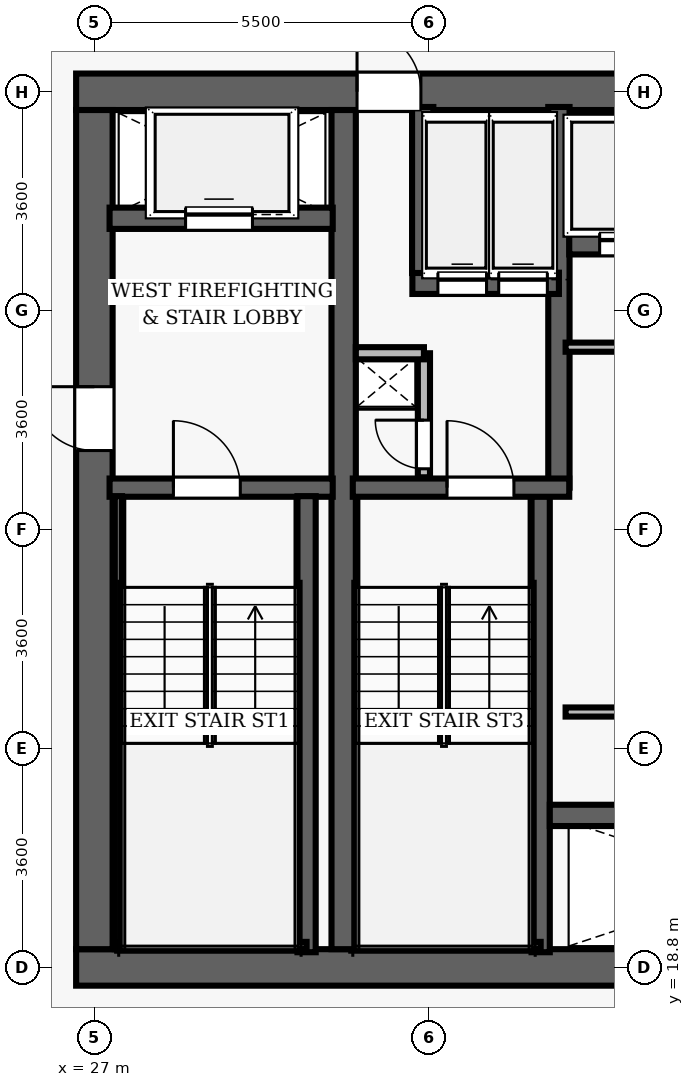
"""IFC4 building model, lengths in metres.
Left out: names, types, materials, properties, quantities, classifications, styles, units other than length and angle.
Written with IfcOpenShell. Run it as: python <this file> out.ifc"""

import sys

from ifc_helpers import new_model, si_unit, direction, frame, frame_2d, origin, place, context, subcontext, project, spatial, rectangle, extrude, element, fill, save


model = new_model("IFC4")
c1 = context("Model", 3, precision=1e-05, world=origin(), true_north=direction((0.0, 1.0)))
c2 = subcontext(c1, "Body", "Model", "MODEL_VIEW")
j1 = project(units=[si_unit("LENGTHUNIT", "METRE"), si_unit("PLANEANGLEUNIT", "RADIAN")], contexts=[c1])
p1 = place(None, origin())
s1 = spatial("IfcSite", under=j1, at=p1, CompositionType="ELEMENT")
p2 = place(p1, origin())
s2 = spatial("IfcBuilding", under=s1, at=p2, CompositionType="ELEMENT")
p3 = place(p2, frame((0.0, 0.0, 51.9)))
s3 = spatial("IfcBuildingStorey", under=s2, at=p3, CompositionType="ELEMENT", Elevation=51.9)
p4 = place(p3, frame((26.7, 18.8, 0.0), z_axis=(0.0, 0.0, 1.0), x_axis=(1.0, 0.0, 0.0)))
e1 = element("IfcWall", 1, at=p4, inside=s3, PredefinedType="SHEAR", context=c2, shape_type="SweptSolid", body=[
    extrude(rectangle(XDim=22.6, YDim=0.6, at=frame_2d((11.3, 0.0))), origin(), (0.0, 0.0, 1.0), 3.5),
])
p5 = place(p4, frame((14.52, 0.0, 0.0)))
e2 = element("IfcOpeningElement", 2, at=p5, cuts=e1, PredefinedType="OPENING", context=c2, shape_type="SweptSolid", body=[
    extrude(rectangle(XDim=1.05, YDim=2.15, at=frame_2d((0.525, 1.075))), frame((0.0, 0.31, 0.0), z_axis=(0.0, -1.0, 0.0), x_axis=(1.0, 0.0, 0.0)), (0.0, 0.0, 1.0), 0.62),
])
p6 = place(p3, frame((26.7, 33.2, 0.0), z_axis=(0.0, 0.0, 1.0), x_axis=(1.0, 0.0, 0.0)))
e3 = element("IfcWall", 3, at=p6, inside=s3, PredefinedType="SHEAR", context=c2, shape_type="SweptSolid", body=[
    extrude(rectangle(XDim=22.6, YDim=0.6, at=frame_2d((11.3, 0.0))), origin(), (0.0, 0.0, 1.0), 3.5),
])
p7 = place(p6, frame((4.62, 0.0, 0.0)))
e4 = element("IfcOpeningElement", 4, at=p7, cuts=e3, PredefinedType="OPENING", context=c2, shape_type="SweptSolid", body=[
    extrude(rectangle(XDim=1.05, YDim=2.15, at=frame_2d((0.525, 1.075))), frame((0.0, 0.31, 0.0), z_axis=(0.0, -1.0, 0.0), x_axis=(1.0, 0.0, 0.0)), (0.0, 0.0, 1.0), 0.62),
])
p8 = place(p6, frame((14.52, 0.0, 0.0)))
e5 = element("IfcOpeningElement", 5, at=p8, cuts=e3, PredefinedType="OPENING", context=c2, shape_type="SweptSolid", body=[
    extrude(rectangle(XDim=1.05, YDim=2.15, at=frame_2d((0.525, 1.075))), frame((0.0, 0.31, 0.0), z_axis=(0.0, -1.0, 0.0), x_axis=(1.0, 0.0, 0.0)), (0.0, 0.0, 1.0), 0.62),
])
p9 = place(p3, frame((27.0, 19.1, 0.0), z_axis=(0.0, 0.0, 1.0), x_axis=(0.0, 1.0, 0.0)))
e6 = element("IfcWall", 6, at=p9, inside=s3, PredefinedType="SHEAR", context=c2, shape_type="SweptSolid", body=[
    extrude(rectangle(XDim=13.8, YDim=0.6, at=frame_2d((6.9, 0.0))), origin(), (0.0, 0.0, 1.0), 3.5),
])
p10 = place(p9, frame((8.2, 0.0, 0.0)))
e7 = element("IfcOpeningElement", 7, at=p10, cuts=e6, PredefinedType="OPENING", context=c2, shape_type="SweptSolid", body=[
    extrude(rectangle(XDim=1.05, YDim=2.15, at=frame_2d((0.525, 1.075))), frame((0.0, 0.31, 0.0), z_axis=(0.0, -1.0, 0.0), x_axis=(1.0, 0.0, 0.0)), (0.0, 0.0, 1.0), 0.62),
])
p11 = place(p3, frame((31.1, 19.1, 0.0), z_axis=(0.0, 0.0, 1.0), x_axis=(0.0, 1.0, 0.0)))
e8 = element("IfcWall", 8, at=p11, inside=s3, PredefinedType="SHEAR", context=c2, shape_type="SweptSolid", body=[
    extrude(rectangle(XDim=13.8, YDim=0.4, at=frame_2d((6.9, 0.0))), origin(), (0.0, 0.0, 1.0), 3.5),
])
p12 = place(p3, frame((27.25, 26.69, 0.0), z_axis=(0.0, 0.0, 1.0), x_axis=(1.0, 0.0, 0.0)))
e9 = element("IfcWall", 9, at=p12, inside=s3, PredefinedType="SHEAR", context=c2, shape_type="SweptSolid", body=[
    extrude(rectangle(XDim=3.67, YDim=0.3, at=frame_2d((1.835, 0.0))), origin(), (0.0, 0.0, 1.0), 3.5),
])
p13 = place(p12, frame((1.05, 0.0, 0.0)))
e10 = element("IfcOpeningElement", 10, at=p13, cuts=e9, PredefinedType="OPENING", context=c2, shape_type="SweptSolid", body=[
    extrude(rectangle(XDim=1.1, YDim=2.15, at=frame_2d((0.55, 1.075))), frame((0.0, 0.16, 0.0), z_axis=(0.0, -1.0, 0.0), x_axis=(1.0, 0.0, 0.0)), (0.0, 0.0, 1.0), 0.32),
])
p14 = place(p3, frame((30.49, 19.05, 0.0), z_axis=(0.0, 0.0, 1.0), x_axis=(0.0, 1.0, 0.0)))
e11 = element("IfcWall", 11, at=p14, inside=s3, PredefinedType="SHEAR", context=c2, shape_type="SweptSolid", body=[
    extrude(rectangle(XDim=7.5, YDim=0.3, at=frame_2d((3.75, 0.0))), origin(), (0.0, 0.0, 1.0), 3.5),
])
p15 = place(p3, frame((27.395, 19.1, 0.0), z_axis=(0.0, 0.0, 1.0), x_axis=(0.0, 1.0, 0.0)))
e12 = element("IfcWall", 12, at=p15, inside=s3, PredefinedType="SHEAR", context=c2, shape_type="SweptSolid", body=[
    extrude(rectangle(XDim=7.45, YDim=0.12, at=frame_2d((3.725, 0.0))), origin(), (0.0, 0.0, 1.0), 3.5),
])
p16 = place(p3, frame((27.395, 19.16, 0.0), z_axis=(0.0, 0.0, 1.0), x_axis=(1.0, 0.0, 0.0)))
e13 = element("IfcWall", 13, at=p16, inside=s3, PredefinedType="SHEAR", context=c2, shape_type="SweptSolid", body=[
    extrude(rectangle(XDim=3.095, YDim=0.12, at=frame_2d((1.547, 0.0))), origin(), (0.0, 0.0, 1.0), 3.5),
])
p17 = place(p3, frame((27.25, 31.12, 0.0), z_axis=(0.0, 0.0, 1.0), x_axis=(1.0, 0.0, 0.0)))
e14 = element("IfcWall", 14, at=p17, inside=s3, PredefinedType="SHEAR", context=c2, shape_type="SweptSolid", body=[
    extrude(rectangle(XDim=3.67, YDim=0.35, at=frame_2d((1.835, 0.0))), origin(), (0.0, 0.0, 1.0), 2.6),
])
p18 = place(p17, frame((1.25, 0.0, 0.0)))
e15 = element("IfcOpeningElement", 15, at=p18, cuts=e14, PredefinedType="OPENING", context=c2, shape_type="SweptSolid", body=[
    extrude(rectangle(XDim=1.1, YDim=2.15, at=frame_2d((0.55, 1.075))), frame((0.0, 0.185, 0.0), z_axis=(0.0, -1.0, 0.0), x_axis=(1.0, 0.0, 0.0)), (0.0, 0.0, 1.0), 0.37),
])
p19 = place(p3, frame((34.34, 19.05, 0.0), z_axis=(0.0, 0.0, 1.0), x_axis=(0.0, 1.0, 0.0)))
e16 = element("IfcWall", 16, at=p19, inside=s3, PredefinedType="SHEAR", context=c2, shape_type="SweptSolid", body=[
    extrude(rectangle(XDim=7.5, YDim=0.3, at=frame_2d((3.75, 0.0))), origin(), (0.0, 0.0, 1.0), 3.5),
])
p20 = place(p3, frame((34.64, 26.69, 0.0), z_axis=(0.0, 0.0, 1.0), x_axis=(0.0, 1.0, 0.0)))
e17 = element("IfcWall", 17, at=p20, inside=s3, PredefinedType="SHEAR", context=c2, shape_type="SweptSolid", body=[
    extrude(rectangle(XDim=6.26, YDim=0.35, at=frame_2d((3.13, 0.0))), origin(), (0.0, 0.0, 1.0), 3.5),
])
p21 = place(p3, frame((31.25, 26.69, 0.0), z_axis=(0.0, 0.0, 1.0), x_axis=(1.0, 0.0, 0.0)))
e18 = element("IfcWall", 18, at=p21, inside=s3, PredefinedType="SHEAR", context=c2, shape_type="SweptSolid", body=[
    extrude(rectangle(XDim=3.56, YDim=0.3, at=frame_2d((1.78, 0.0))), origin(), (0.0, 0.0, 1.0), 3.5),
])
p22 = place(p21, frame((1.55, 0.0, 0.0)))
e19 = element("IfcOpeningElement", 19, at=p22, cuts=e18, PredefinedType="OPENING", context=c2, shape_type="SweptSolid", body=[
    extrude(rectangle(XDim=1.1, YDim=2.15, at=frame_2d((0.55, 1.075))), frame((0.0, 0.16, 0.0), z_axis=(0.0, -1.0, 0.0), x_axis=(1.0, 0.0, 0.0)), (0.0, 0.0, 1.0), 0.32),
])
p23 = place(p3, frame((31.3, 19.16, 0.0), z_axis=(0.0, 0.0, 1.0), x_axis=(1.0, 0.0, 0.0)))
e20 = element("IfcWall", 20, at=p23, inside=s3, PredefinedType="SHEAR", context=c2, shape_type="SweptSolid", body=[
    extrude(rectangle(XDim=3.04, YDim=0.12, at=frame_2d((1.52, 0.0))), origin(), (0.0, 0.0, 1.0), 3.5),
])
p24 = place(p3, frame((32.23, 30.05, 0.0), z_axis=(0.0, 0.0, 1.0), x_axis=(1.0, 0.0, 0.0)))
e21 = element("IfcWall", 21, at=p24, inside=s3, PredefinedType="SHEAR", context=c2, shape_type="SweptSolid", body=[
    extrude(rectangle(XDim=2.41, YDim=0.35, at=frame_2d((1.205, 0.0))), origin(), (0.0, 0.0, 1.0), 2.6),
])
p25 = place(p24, frame((0.42, 0.0, 0.0)))
e22 = element("IfcOpeningElement", 22, at=p25, cuts=e21, PredefinedType="OPENING", context=c2, shape_type="SweptSolid", body=[
    extrude(rectangle(XDim=0.8, YDim=2.15, at=frame_2d((0.4, 1.075))), frame((0.0, 0.185, 0.0), z_axis=(0.0, -1.0, 0.0), x_axis=(1.0, 0.0, 0.0)), (0.0, 0.0, 1.0), 0.37),
])
p26 = place(p24, frame((1.42, 0.0, 0.0)))
e23 = element("IfcOpeningElement", 23, at=p26, cuts=e21, PredefinedType="OPENING", context=c2, shape_type="SweptSolid", body=[
    extrude(rectangle(XDim=0.8, YDim=2.15, at=frame_2d((0.4, 1.075))), frame((0.0, 0.185, 0.0), z_axis=(0.0, -1.0, 0.0), x_axis=(1.0, 0.0, 0.0)), (0.0, 0.0, 1.0), 0.37),
])
p27 = place(p3, frame((32.4, 30.22, 0.0), z_axis=(0.0, 0.0, 1.0), x_axis=(0.0, 1.0, 0.0)))
e24 = element("IfcWall", 24, at=p27, inside=s3, PredefinedType="SHEAR", context=c2, shape_type="SweptSolid", body=[
    extrude(rectangle(XDim=2.73, YDim=0.35, at=frame_2d((1.365, 0.0))), origin(), (0.0, 0.0, 1.0), 2.6),
])
p28 = place(p3, frame((32.42, 26.86, 0.0), z_axis=(0.0, 0.0, 1.0), x_axis=(0.0, 1.0, 0.0)))
e25 = element("IfcWall", 25, at=p28, inside=s3, PredefinedType="PARTITIONING", context=c2, shape_type="SweptSolid", body=[
    extrude(rectangle(XDim=2.04, YDim=0.2, at=frame_2d((1.02, 0.0))), origin(), (0.0, 0.0, 1.0), 2.6),
])
p29 = place(p28, frame((0.14, 0.0, 0.0)))
e26 = element("IfcOpeningElement", 26, at=p29, cuts=e25, PredefinedType="OPENING", context=c2, shape_type="SweptSolid", body=[
    extrude(rectangle(XDim=0.8, YDim=2.05, at=frame_2d((0.4, 1.025))), frame((0.0, 0.11, 0.0), z_axis=(0.0, -1.0, 0.0), x_axis=(1.0, 0.0, 0.0)), (0.0, 0.0, 1.0), 0.22),
])
p30 = place(p3, frame((31.3, 28.9, 0.0), z_axis=(0.0, 0.0, 1.0), x_axis=(1.0, 0.0, 0.0)))
e27 = element("IfcWall", 27, at=p30, inside=s3, PredefinedType="PARTITIONING", context=c2, shape_type="SweptSolid", body=[
    extrude(rectangle(XDim=1.12, YDim=0.2, at=frame_2d((0.56, 0.0))), origin(), (0.0, 0.0, 1.0), 2.6),
])
p31 = place(p3, frame((34.81, 30.7, 0.0), z_axis=(0.0, 0.0, 1.0), x_axis=(1.0, 0.0, 0.0)))
e28 = element("IfcWall", 28, at=p31, inside=s3, PredefinedType="SHEAR", context=c2, shape_type="SweptSolid", body=[
    extrude(rectangle(XDim=6.36, YDim=0.35, at=frame_2d((3.18, 0.0))), origin(), (0.0, 0.0, 1.0), 2.6),
])
p32 = place(p31, frame((0.5, 0.0, 0.0)))
e29 = element("IfcOpeningElement", 29, at=p32, cuts=e28, PredefinedType="OPENING", context=c2, shape_type="SweptSolid", body=[
    extrude(rectangle(XDim=0.9, YDim=2.15, at=frame_2d((0.45, 1.075))), frame((0.0, 0.185, 0.0), z_axis=(0.0, -1.0, 0.0), x_axis=(1.0, 0.0, 0.0)), (0.0, 0.0, 1.0), 0.37),
])
p33 = place(p31, frame((2.58, 0.0, 0.0)))
e30 = element("IfcOpeningElement", 30, at=p33, cuts=e28, PredefinedType="OPENING", context=c2, shape_type="SweptSolid", body=[
    extrude(rectangle(XDim=0.9, YDim=2.15, at=frame_2d((0.45, 1.075))), frame((0.0, 0.185, 0.0), z_axis=(0.0, -1.0, 0.0), x_axis=(1.0, 0.0, 0.0)), (0.0, 0.0, 1.0), 0.37),
])
p34 = place(p31, frame((4.66, 0.0, 0.0)))
e31 = element("IfcOpeningElement", 31, at=p34, cuts=e28, PredefinedType="OPENING", context=c2, shape_type="SweptSolid", body=[
    extrude(rectangle(XDim=0.9, YDim=2.15, at=frame_2d((0.45, 1.075))), frame((0.0, 0.185, 0.0), z_axis=(0.0, -1.0, 0.0), x_axis=(1.0, 0.0, 0.0)), (0.0, 0.0, 1.0), 0.37),
])
p35 = place(p3, frame((34.49, 21.3, 0.0), z_axis=(0.0, 0.0, 1.0), x_axis=(1.0, 0.0, 0.0)))
e32 = element("IfcWall", 32, at=p35, inside=s3, PredefinedType="SHEAR", context=c2, shape_type="SweptSolid", body=[
    extrude(rectangle(XDim=6.68, YDim=0.35, at=frame_2d((3.34, 0.0))), origin(), (0.0, 0.0, 1.0), 2.6),
])
for number, where, z_axis, x_axis in (
    (33, (34.75, 29.0, 0.0), (0.0, 0.0, 1.0), (1.0, 0.0, 0.0)),
    (34, (34.75, 23.0, 0.0), (0.0, 0.0, 1.0), (1.0, 0.0, 0.0)),
):
    element("IfcWall", number, at=place(p3, frame(where, z_axis=z_axis, x_axis=x_axis)), inside=s3, PredefinedType="PARTITIONING", context=c2, shape_type="SweptSolid", body=[
        extrude(rectangle(XDim=6.25, YDim=0.15, at=frame_2d((3.125, 0.0))), origin(), (0.0, 0.0, 1.0), 2.6),
    ])
p36 = place(p13, origin())
e35 = element("IfcDoor", 35, at=p36, inside=s3, OperationType="SINGLE_SWING_LEFT", PredefinedType="DOOR", context=c2, shape_type="SweptSolid", body=[
    extrude(rectangle(XDim=1.1, YDim=2.15, at=frame_2d((0.55, 1.075))), frame((0.0, 0.025, 0.0), z_axis=(0.0, -1.0, 0.0), x_axis=(1.0, 0.0, 0.0)), (0.0, 0.0, 1.0), 0.05),
])
fill(e10, e35)
p37 = place(p10, origin())
e36 = element("IfcDoor", 36, at=p37, inside=s3, OperationType="SINGLE_SWING_RIGHT", PredefinedType="DOOR", context=c2, shape_type="SweptSolid", body=[
    extrude(rectangle(XDim=1.05, YDim=2.15, at=frame_2d((0.525, 1.075))), frame((0.0, 0.025, 0.0), z_axis=(0.0, -1.0, 0.0), x_axis=(1.0, 0.0, 0.0)), (0.0, 0.0, 1.0), 0.05),
])
fill(e7, e36)
p38 = place(p22, origin())
e37 = element("IfcDoor", 37, at=p38, inside=s3, OperationType="SINGLE_SWING_LEFT", PredefinedType="DOOR", context=c2, shape_type="SweptSolid", body=[
    extrude(rectangle(XDim=1.1, YDim=2.15, at=frame_2d((0.55, 1.075))), frame((0.0, 0.025, 0.0), z_axis=(0.0, -1.0, 0.0), x_axis=(1.0, 0.0, 0.0)), (0.0, 0.0, 1.0), 0.05),
])
fill(e19, e37)
p39 = place(p29, origin())
e38 = element("IfcDoor", 38, at=p39, inside=s3, OperationType="SINGLE_SWING_RIGHT", PredefinedType="DOOR", context=c2, shape_type="SweptSolid", body=[
    extrude(rectangle(XDim=0.8, YDim=2.05, at=frame_2d((0.4, 1.025))), frame((0.0, 0.025, 0.0), z_axis=(0.0, -1.0, 0.0), x_axis=(1.0, 0.0, 0.0)), (0.0, 0.0, 1.0), 0.05),
])
fill(e26, e38)
p40 = place(p7, origin())
e39 = element("IfcDoor", 39, at=p40, inside=s3, OperationType="SINGLE_SWING_LEFT", PredefinedType="DOOR", context=c2, shape_type="SweptSolid", body=[
    extrude(rectangle(XDim=1.05, YDim=2.15, at=frame_2d((0.525, 1.075))), frame((0.0, 0.025, 0.0), z_axis=(0.0, -1.0, 0.0), x_axis=(1.0, 0.0, 0.0)), (0.0, 0.0, 1.0), 0.05),
])
fill(e4, e39)
p41 = place(p32, origin())
e40 = element("IfcDoor", 40, at=p41, inside=s3, OperationType="SLIDING_TO_LEFT", PredefinedType="DOOR", context=c2, shape_type="SweptSolid", body=[
    extrude(rectangle(XDim=0.9, YDim=2.15, at=frame_2d((0.45, 1.075))), frame((0.0, 0.025, 0.0), z_axis=(0.0, -1.0, 0.0), x_axis=(1.0, 0.0, 0.0)), (0.0, 0.0, 1.0), 0.05),
])
fill(e29, e40)
p42 = place(p18, origin())
e41 = element("IfcDoor", 41, at=p42, inside=s3, OperationType="SLIDING_TO_LEFT", PredefinedType="DOOR", context=c2, shape_type="SweptSolid", body=[
    extrude(rectangle(XDim=1.1, YDim=2.15, at=frame_2d((0.55, 1.075))), frame((0.0, 0.025, 0.0), z_axis=(0.0, -1.0, 0.0), x_axis=(1.0, 0.0, 0.0)), (0.0, 0.0, 1.0), 0.05),
])
fill(e15, e41)
p43 = place(p25, origin())
e42 = element("IfcDoor", 42, at=p43, inside=s3, OperationType="SLIDING_TO_LEFT", PredefinedType="DOOR", context=c2, shape_type="SweptSolid", body=[
    extrude(rectangle(XDim=0.8, YDim=2.15, at=frame_2d((0.4, 1.075))), frame((0.0, 0.025, 0.0), z_axis=(0.0, -1.0, 0.0), x_axis=(1.0, 0.0, 0.0)), (0.0, 0.0, 1.0), 0.05),
])
fill(e22, e42)
p44 = place(p26, origin())
e43 = element("IfcDoor", 43, at=p44, inside=s3, OperationType="SLIDING_TO_LEFT", PredefinedType="DOOR", context=c2, shape_type="SweptSolid", body=[
    extrude(rectangle(XDim=0.8, YDim=2.15, at=frame_2d((0.4, 1.075))), frame((0.0, 0.025, 0.0), z_axis=(0.0, -1.0, 0.0), x_axis=(1.0, 0.0, 0.0)), (0.0, 0.0, 1.0), 0.05),
])
fill(e23, e43)
save(model, sys.argv[1])
